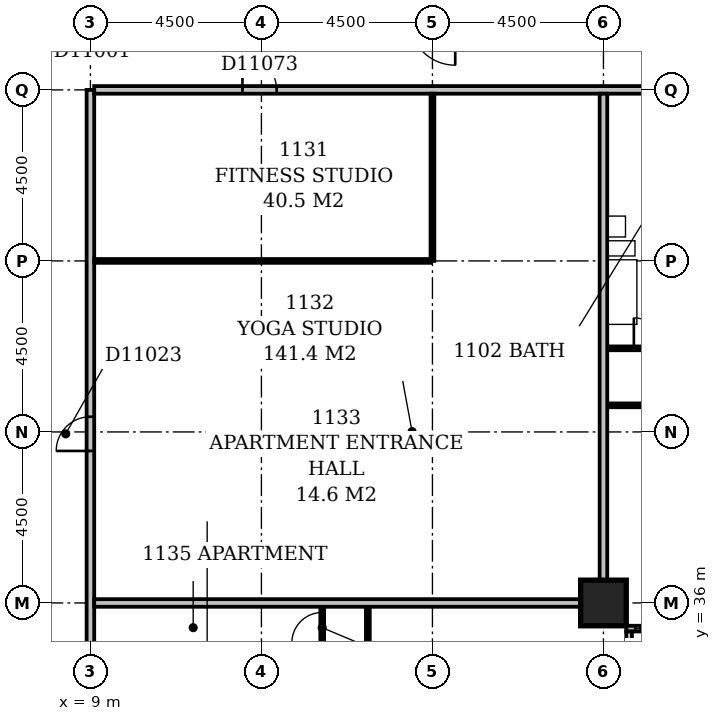
"""IFC4 building model, lengths in metres.
Left out: names, types, materials, properties, quantities, classifications, styles, units other than length and angle.
Written with IfcOpenShell. Run it as: python <this file> out.ifc"""

import sys

from ifc_helpers import new_model, si_unit, direction, frame, frame_2d, origin, origin_2d, place, context, subcontext, project, spatial, rectangle, extrude, element, fill, save


model = new_model("IFC4")
c1 = context("Model", 3, precision=1e-05, world=origin(), true_north=direction((0.0, 1.0)))
c2 = subcontext(c1, "Body", "Model", "MODEL_VIEW")
j1 = project(units=[si_unit("LENGTHUNIT", "METRE"), si_unit("PLANEANGLEUNIT", "RADIAN")], contexts=[c1])
p1 = place(None, origin())
s1 = spatial("IfcSite", under=j1, at=p1, CompositionType="ELEMENT")
p2 = place(p1, origin())
s2 = spatial("IfcBuilding", under=s1, at=p2, CompositionType="ELEMENT")
p3 = place(p2, frame((0.0, 0.0, 50.6)))
s3 = spatial("IfcBuildingStorey", under=s2, at=p3, CompositionType="ELEMENT", Elevation=50.6)
p4 = place(p3, frame((22.5, 36.0, -0.3), z_axis=(0.0, 0.0, 1.0), x_axis=(1.0, 0.0, 0.0)))
e1 = element("IfcColumn", 1, at=p4, inside=s3, PredefinedType="COLUMN", context=c2, shape_type="SweptSolid", body=[
    extrude(rectangle(XDim=1.2, YDim=1.2, at=origin_2d()), origin(), (0.0, 0.0, 1.0), 3.6),
])
p5 = place(p3, frame((23.175, 17.4, 0.0), z_axis=(0.0, 0.0, 1.0), x_axis=(0.0, 1.0, 0.0)))
e2 = element("IfcWall", 2, at=p5, inside=s3, PredefinedType="STANDARD", context=c2, shape_type="SweptSolid", body=[
    extrude(rectangle(XDim=17.85, YDim=0.15, at=frame_2d((8.925, 0.0))), origin(), (0.0, 0.0, 1.0), 2.7),
])
p6 = place(p5, frame((3.375, 0.0, 0.6)))
e3 = element("IfcOpeningElement", 3, at=p6, cuts=e2, PredefinedType="OPENING", context=c2, shape_type="SweptSolid", body=[
    extrude(rectangle(XDim=0.9, YDim=1.8, at=frame_2d((0.45, 0.9))), frame((0.0, 0.087, 0.0), z_axis=(0.0, -1.0, 0.0), x_axis=(1.0, 0.0, 0.0)), (0.0, 0.0, 1.0), 0.174),
])
p7 = place(p5, frame((6.15, 0.0, 0.6)))
e4 = element("IfcOpeningElement", 4, at=p7, cuts=e2, PredefinedType="OPENING", context=c2, shape_type="SweptSolid", body=[
    extrude(rectangle(XDim=2.4, YDim=1.8, at=frame_2d((1.2, 0.9))), frame((0.0, 0.087, 0.0), z_axis=(0.0, -1.0, 0.0), x_axis=(1.0, 0.0, 0.0)), (0.0, 0.0, 1.0), 0.174),
])
p8 = place(p5, frame((10.65, 0.0, 0.6)))
e5 = element("IfcOpeningElement", 5, at=p8, cuts=e2, PredefinedType="OPENING", context=c2, shape_type="SweptSolid", body=[
    extrude(rectangle(XDim=2.4, YDim=1.8, at=frame_2d((1.2, 0.9))), frame((0.0, 0.087, 0.0), z_axis=(0.0, -1.0, 0.0), x_axis=(1.0, 0.0, 0.0)), (0.0, 0.0, 1.0), 0.174),
])
p9 = place(p5, frame((14.992, 0.0, 0.6)))
e6 = element("IfcOpeningElement", 6, at=p9, cuts=e2, PredefinedType="OPENING", context=c2, shape_type="SweptSolid", body=[
    extrude(rectangle(XDim=2.1, YDim=1.8, at=frame_2d((1.05, 0.9))), frame((0.0, 0.087, 0.0), z_axis=(0.0, -1.0, 0.0), x_axis=(1.0, 0.0, 0.0)), (0.0, 0.0, 1.0), 0.174),
])
p10 = place(p3, frame((23.1, 35.325, 0.0), z_axis=(0.0, 0.0, 1.0), x_axis=(1.0, 0.0, 0.0)))
e7 = element("IfcWall", 7, at=p10, inside=s3, PredefinedType="STANDARD", context=c2, shape_type="SweptSolid", body=[
    extrude(rectangle(XDim=45.15, YDim=0.15, at=frame_2d((22.575, 0.0))), origin(), (0.0, 0.0, 1.0), 2.7),
])
p11 = place(p10, frame((0.235, 0.0, 0.6)))
e8 = element("IfcOpeningElement", 8, at=p11, cuts=e7, PredefinedType="OPENING", context=c2, shape_type="SweptSolid", body=[
    extrude(rectangle(XDim=0.45, YDim=1.8, at=frame_2d((0.225, 0.9))), frame((0.0, 0.087, 0.0), z_axis=(0.0, -1.0, 0.0), x_axis=(1.0, 0.0, 0.0)), (0.0, 0.0, 1.0), 0.174),
])
p12 = place(p10, frame((2.605, 0.0, 0.6)))
e9 = element("IfcOpeningElement", 9, at=p12, cuts=e7, PredefinedType="OPENING", context=c2, shape_type="SweptSolid", body=[
    extrude(rectangle(XDim=0.45, YDim=1.8, at=frame_2d((0.225, 0.9))), frame((0.0, 0.087, 0.0), z_axis=(0.0, -1.0, 0.0), x_axis=(1.0, 0.0, 0.0)), (0.0, 0.0, 1.0), 0.174),
])
p13 = place(p10, frame((4.95, 0.0, 0.6)))
e10 = element("IfcOpeningElement", 10, at=p13, cuts=e7, PredefinedType="OPENING", context=c2, shape_type="SweptSolid", body=[
    extrude(rectangle(XDim=2.4, YDim=1.8, at=frame_2d((1.2, 0.9))), frame((0.0, 0.087, 0.0), z_axis=(0.0, -1.0, 0.0), x_axis=(1.0, 0.0, 0.0)), (0.0, 0.0, 1.0), 0.174),
])
p14 = place(p10, frame((9.45, 0.0, 0.6)))
e11 = element("IfcOpeningElement", 11, at=p14, cuts=e7, PredefinedType="OPENING", context=c2, shape_type="SweptSolid", body=[
    extrude(rectangle(XDim=2.4, YDim=1.8, at=frame_2d((1.2, 0.9))), frame((0.0, 0.087, 0.0), z_axis=(0.0, -1.0, 0.0), x_axis=(1.0, 0.0, 0.0)), (0.0, 0.0, 1.0), 0.174),
])
p15 = place(p10, frame((13.95, 0.0, 0.6)))
e12 = element("IfcOpeningElement", 12, at=p15, cuts=e7, PredefinedType="OPENING", context=c2, shape_type="SweptSolid", body=[
    extrude(rectangle(XDim=2.4, YDim=1.8, at=frame_2d((1.2, 0.9))), frame((0.0, 0.087, 0.0), z_axis=(0.0, -1.0, 0.0), x_axis=(1.0, 0.0, 0.0)), (0.0, 0.0, 1.0), 0.174),
])
p16 = place(p10, frame((18.45, 0.0, 0.6)))
e13 = element("IfcOpeningElement", 13, at=p16, cuts=e7, PredefinedType="OPENING", context=c2, shape_type="SweptSolid", body=[
    extrude(rectangle(XDim=2.4, YDim=1.8, at=frame_2d((1.2, 0.9))), frame((0.0, 0.087, 0.0), z_axis=(0.0, -1.0, 0.0), x_axis=(1.0, 0.0, 0.0)), (0.0, 0.0, 1.0), 0.174),
])
p17 = place(p10, frame((22.823, 0.0, 0.6)))
e14 = element("IfcOpeningElement", 14, at=p17, cuts=e7, PredefinedType="OPENING", context=c2, shape_type="SweptSolid", body=[
    extrude(rectangle(XDim=1.2, YDim=1.8, at=frame_2d((0.6, 0.9))), frame((0.0, 0.087, 0.0), z_axis=(0.0, -1.0, 0.0), x_axis=(1.0, 0.0, 0.0)), (0.0, 0.0, 1.0), 0.174),
])
p18 = place(p10, frame((29.403, 0.0, 0.6)))
e15 = element("IfcOpeningElement", 15, at=p18, cuts=e7, PredefinedType="OPENING", context=c2, shape_type="SweptSolid", body=[
    extrude(rectangle(XDim=0.6, YDim=1.8, at=frame_2d((0.3, 0.9))), frame((0.0, 0.087, 0.0), z_axis=(0.0, -1.0, 0.0), x_axis=(1.0, 0.0, 0.0)), (0.0, 0.0, 1.0), 0.174),
])
p19 = place(p10, frame((31.95, 0.0, 0.6)))
e16 = element("IfcOpeningElement", 16, at=p19, cuts=e7, PredefinedType="OPENING", context=c2, shape_type="SweptSolid", body=[
    extrude(rectangle(XDim=2.4, YDim=1.8, at=frame_2d((1.2, 0.9))), frame((0.0, 0.087, 0.0), z_axis=(0.0, -1.0, 0.0), x_axis=(1.0, 0.0, 0.0)), (0.0, 0.0, 1.0), 0.174),
])
p20 = place(p10, frame((36.45, 0.0, 0.6)))
e17 = element("IfcOpeningElement", 17, at=p20, cuts=e7, PredefinedType="OPENING", context=c2, shape_type="SweptSolid", body=[
    extrude(rectangle(XDim=2.4, YDim=1.8, at=frame_2d((1.2, 0.9))), frame((0.0, 0.087, 0.0), z_axis=(0.0, -1.0, 0.0), x_axis=(1.0, 0.0, 0.0)), (0.0, 0.0, 1.0), 0.174),
])
p21 = place(p10, frame((40.95, 0.0, 0.6)))
e18 = element("IfcOpeningElement", 18, at=p21, cuts=e7, PredefinedType="OPENING", context=c2, shape_type="SweptSolid", body=[
    extrude(rectangle(XDim=2.4, YDim=1.8, at=frame_2d((1.2, 0.9))), frame((0.0, 0.087, 0.0), z_axis=(0.0, -1.0, 0.0), x_axis=(1.0, 0.0, 0.0)), (0.0, 0.0, 1.0), 0.174),
])
p22 = place(p3, frame((9.0, 5.0, 0.0), z_axis=(0.0, 0.0, 1.0), x_axis=(0.0, 1.0, 0.0)))
e19 = element("IfcWall", 19, at=p22, inside=s3, PredefinedType="PARTITIONING", context=c2, shape_type="SweptSolid", body=[
    extrude(rectangle(XDim=44.5, YDim=0.2, at=frame_2d((22.25, 0.0))), origin(), (0.0, 0.0, 1.0), 3.3),
])
p23 = place(p22, frame((28.45, 0.0, 0.0)))
e20 = element("IfcOpeningElement", 20, at=p23, cuts=e19, PredefinedType="OPENING", context=c2, shape_type="SweptSolid", body=[
    extrude(rectangle(XDim=1.0, YDim=2.1, at=frame_2d((0.5, 1.05))), frame((0.0, 0.112, 0.0), z_axis=(0.0, -1.0, 0.0), x_axis=(1.0, 0.0, 0.0)), (0.0, 0.0, 1.0), 0.224),
])
p24 = place(p22, frame((17.8, 0.0, 0.0)))
e21 = element("IfcOpeningElement", 21, at=p24, cuts=e19, PredefinedType="OPENING", context=c2, shape_type="SweptSolid", body=[
    extrude(rectangle(XDim=1.0, YDim=2.1, at=frame_2d((0.5, 1.05))), frame((0.0, 0.112, 0.0), z_axis=(0.0, -1.0, 0.0), x_axis=(1.0, 0.0, 0.0)), (0.0, 0.0, 1.0), 0.224),
])
p25 = place(p22, frame((14.55, 0.0, 0.0)))
e22 = element("IfcOpeningElement", 22, at=p25, cuts=e19, PredefinedType="OPENING", context=c2, shape_type="SweptSolid", body=[
    extrude(rectangle(XDim=1.0, YDim=2.1, at=frame_2d((0.5, 1.05))), frame((0.0, 0.112, 0.0), z_axis=(0.0, -1.0, 0.0), x_axis=(1.0, 0.0, 0.0)), (0.0, 0.0, 1.0), 0.224),
])
p26 = place(p22, frame((11.7, 0.0, 0.0)))
e23 = element("IfcOpeningElement", 23, at=p26, cuts=e19, PredefinedType="OPENING", context=c2, shape_type="SweptSolid", body=[
    extrude(rectangle(XDim=1.0, YDim=2.1, at=frame_2d((0.5, 1.05))), frame((0.0, 0.112, 0.0), z_axis=(0.0, -1.0, 0.0), x_axis=(1.0, 0.0, 0.0)), (0.0, 0.0, 1.0), 0.224),
])
p27 = place(p22, frame((35.0, 0.0, 0.0)))
e24 = element("IfcOpeningElement", 24, at=p27, cuts=e19, PredefinedType="OPENING", context=c2, shape_type="SweptSolid", body=[
    extrude(rectangle(XDim=0.9, YDim=2.1, at=frame_2d((0.45, 1.05))), frame((0.0, 0.112, 0.0), z_axis=(0.0, -1.0, 0.0), x_axis=(1.0, 0.0, 0.0)), (0.0, 0.0, 1.0), 0.224),
])
p28 = place(p22, frame((1.5, 0.0, 0.0)))
e25 = element("IfcOpeningElement", 25, at=p28, cuts=e19, PredefinedType="OPENING", context=c2, shape_type="SweptSolid", body=[
    extrude(rectangle(XDim=0.9, YDim=2.1, at=frame_2d((0.45, 1.05))), frame((0.0, 0.112, 0.0), z_axis=(0.0, -1.0, 0.0), x_axis=(1.0, 0.0, 0.0)), (0.0, 0.0, 1.0), 0.224),
])
p29 = place(p3, frame((16.3, 31.6, 0.0), z_axis=(0.0, 0.0, 1.0), x_axis=(0.0, 1.0, 0.0)))
e26 = element("IfcWall", 26, at=p29, inside=s3, PredefinedType="PARTITIONING", context=c2, shape_type="SweptSolid", body=[
    extrude(rectangle(XDim=4.3, YDim=0.1, at=frame_2d((2.15, 0.0))), origin(), (0.0, 0.0, 1.0), 3.3),
])
p30 = place(p29, frame((1.7, 0.0, 0.0)))
e27 = element("IfcOpeningElement", 27, at=p30, cuts=e26, PredefinedType="OPENING", context=c2, shape_type="SweptSolid", body=[
    extrude(rectangle(XDim=0.9, YDim=2.1, at=frame_2d((0.45, 1.05))), frame((0.0, 0.062, 0.0), z_axis=(0.0, -1.0, 0.0), x_axis=(1.0, 0.0, 0.0)), (0.0, 0.0, 1.0), 0.124),
])
p31 = place(p3, frame((15.1, 34.7, 0.0), z_axis=(0.0, 0.0, 1.0), x_axis=(0.0, 1.0, 0.0)))
e28 = element("IfcWall", 28, at=p31, inside=s3, PredefinedType="PARTITIONING", context=c2, shape_type="SweptSolid", body=[
    extrude(rectangle(XDim=1.2, YDim=0.1, at=frame_2d((0.6, 0.0))), origin(), (0.0, 0.0, 1.0), 3.3),
])
p32 = place(p31, frame((0.25, 0.0, 0.0)))
e29 = element("IfcOpeningElement", 29, at=p32, cuts=e28, PredefinedType="OPENING", context=c2, shape_type="SweptSolid", body=[
    extrude(rectangle(XDim=0.8, YDim=2.1, at=frame_2d((0.4, 1.05))), frame((0.0, 0.062, 0.0), z_axis=(0.0, -1.0, 0.0), x_axis=(1.0, 0.0, 0.0)), (0.0, 0.0, 1.0), 0.124),
])
p33 = place(p3, frame((9.1, 36.0, 0.0), z_axis=(0.0, 0.0, 1.0), x_axis=(1.0, 0.0, 0.0)))
e30 = element("IfcWall", 30, at=p33, inside=s3, PredefinedType="PARTITIONING", context=c2, shape_type="SweptSolid", body=[
    extrude(rectangle(XDim=12.8, YDim=0.2, at=frame_2d((6.4, 0.0))), origin(), (0.0, 0.0, 1.0), 2.4),
])
p34 = place(p3, frame((22.5, 36.6, 0.0), z_axis=(0.0, 0.0, 1.0), x_axis=(0.0, 1.0, 0.0)))
e31 = element("IfcWall", 31, at=p34, inside=s3, PredefinedType="PARTITIONING", context=c2, shape_type="SweptSolid", body=[
    extrude(rectangle(XDim=12.8, YDim=0.2, at=frame_2d((6.4, 0.0))), origin(), (0.0, 0.0, 1.0), 3.3),
])
p35 = place(p3, frame((22.6, 41.2, 0.0), z_axis=(0.0, 0.0, 1.0), x_axis=(1.0, 0.0, 0.0)))
e32 = element("IfcWall", 32, at=p35, inside=s3, PredefinedType="PARTITIONING", context=c2, shape_type="SweptSolid", body=[
    extrude(rectangle(XDim=17.8, YDim=0.1, at=frame_2d((8.9, 0.0))), origin(), (0.0, 0.0, 1.0), 3.3),
])
p36 = place(p35, frame((1.7, 0.0, 0.0)))
e33 = element("IfcOpeningElement", 33, at=p36, cuts=e32, PredefinedType="OPENING", context=c2, shape_type="SweptSolid", body=[
    extrude(rectangle(XDim=0.9, YDim=2.1, at=frame_2d((0.45, 1.05))), frame((0.0, 0.062, 0.0), z_axis=(0.0, -1.0, 0.0), x_axis=(1.0, 0.0, 0.0)), (0.0, 0.0, 1.0), 0.124),
])
p37 = place(p35, frame((6.2, 0.0, 0.0)))
e34 = element("IfcOpeningElement", 34, at=p37, cuts=e32, PredefinedType="OPENING", context=c2, shape_type="SweptSolid", body=[
    extrude(rectangle(XDim=0.9, YDim=2.1, at=frame_2d((0.45, 1.05))), frame((0.0, 0.062, 0.0), z_axis=(0.0, -1.0, 0.0), x_axis=(1.0, 0.0, 0.0)), (0.0, 0.0, 1.0), 0.124),
])
p38 = place(p35, frame((11.85, 0.0, 0.0)))
e35 = element("IfcOpeningElement", 35, at=p38, cuts=e32, PredefinedType="OPENING", context=c2, shape_type="SweptSolid", body=[
    extrude(rectangle(XDim=0.9, YDim=2.1, at=frame_2d((0.45, 1.05))), frame((0.0, 0.062, 0.0), z_axis=(0.0, -1.0, 0.0), x_axis=(1.0, 0.0, 0.0)), (0.0, 0.0, 1.0), 0.124),
])
p39 = place(p35, frame((15.2, 0.0, 0.0)))
e36 = element("IfcOpeningElement", 36, at=p39, cuts=e32, PredefinedType="OPENING", context=c2, shape_type="SweptSolid", body=[
    extrude(rectangle(XDim=0.9, YDim=2.1, at=frame_2d((0.45, 1.05))), frame((0.0, 0.062, 0.0), z_axis=(0.0, -1.0, 0.0), x_axis=(1.0, 0.0, 0.0)), (0.0, 0.0, 1.0), 0.124),
])
p40 = place(p3, frame((22.6, 42.7, 0.0), z_axis=(0.0, 0.0, 1.0), x_axis=(1.0, 0.0, 0.0)))
e37 = element("IfcWall", 37, at=p40, inside=s3, PredefinedType="PARTITIONING", context=c2, shape_type="SweptSolid", body=[
    extrude(rectangle(XDim=2.25, YDim=0.1, at=frame_2d((1.125, 0.0))), origin(), (0.0, 0.0, 1.0), 3.3),
])
p41 = place(p40, frame((0.7, 0.0, 0.0)))
e38 = element("IfcOpeningElement", 38, at=p41, cuts=e37, PredefinedType="OPENING", context=c2, shape_type="SweptSolid", body=[
    extrude(rectangle(XDim=0.8, YDim=2.1, at=frame_2d((0.4, 1.05))), frame((0.0, 0.062, 0.0), z_axis=(0.0, -1.0, 0.0), x_axis=(1.0, 0.0, 0.0)), (0.0, 0.0, 1.0), 0.124),
])
p42 = place(p3, frame((9.1, 45.0, 0.0), z_axis=(0.0, 0.0, 1.0), x_axis=(1.0, 0.0, 0.0)))
e39 = element("IfcWall", 39, at=p42, inside=s3, PredefinedType="PARTITIONING", context=c2, shape_type="SweptSolid", body=[
    extrude(rectangle(XDim=8.85, YDim=0.1, at=frame_2d((4.425, 0.0))), origin(), (0.0, 0.0, 1.0), 3.3),
])
p43 = place(p3, frame((18.0, 45.0, 0.0), z_axis=(0.0, 0.0, 1.0), x_axis=(0.0, 1.0, 0.0)))
e40 = element("IfcWall", 40, at=p43, inside=s3, PredefinedType="PARTITIONING", context=c2, shape_type="SweptSolid", body=[
    extrude(rectangle(XDim=4.4, YDim=0.1, at=frame_2d((2.2, 0.0))), origin(), (0.0, 0.0, 1.0), 3.3),
])
p44 = place(p3, frame((9.1, 49.5, 0.0), z_axis=(0.0, 0.0, 1.0), x_axis=(1.0, 0.0, 0.0)))
e41 = element("IfcWall", 41, at=p44, inside=s3, PredefinedType="PARTITIONING", context=c2, shape_type="SweptSolid", body=[
    extrude(rectangle(XDim=57.8, YDim=0.2, at=frame_2d((28.9, 0.0))), origin(), (0.0, 0.0, 1.0), 3.3),
])
p45 = place(p44, frame((16.1, 0.0, 0.0)))
e42 = element("IfcOpeningElement", 42, at=p45, cuts=e41, PredefinedType="OPENING", context=c2, shape_type="SweptSolid", body=[
    extrude(rectangle(XDim=1.0, YDim=2.1, at=frame_2d((0.5, 1.05))), frame((0.0, 0.112, 0.0), z_axis=(0.0, -1.0, 0.0), x_axis=(1.0, 0.0, 0.0)), (0.0, 0.0, 1.0), 0.224),
])
p46 = place(p44, frame((40.0, 0.0, 0.0)))
e43 = element("IfcOpeningElement", 43, at=p46, cuts=e41, PredefinedType="OPENING", context=c2, shape_type="SweptSolid", body=[
    extrude(rectangle(XDim=1.0, YDim=2.1, at=frame_2d((0.5, 1.05))), frame((0.0, 0.112, 0.0), z_axis=(0.0, -1.0, 0.0), x_axis=(1.0, 0.0, 0.0)), (0.0, 0.0, 1.0), 0.224),
])
p47 = place(p44, frame((45.2, 0.0, 0.0)))
e44 = element("IfcOpeningElement", 44, at=p47, cuts=e41, PredefinedType="OPENING", context=c2, shape_type="SweptSolid", body=[
    extrude(rectangle(XDim=1.0, YDim=2.1, at=frame_2d((0.5, 1.05))), frame((0.0, 0.112, 0.0), z_axis=(0.0, -1.0, 0.0), x_axis=(1.0, 0.0, 0.0)), (0.0, 0.0, 1.0), 0.224),
])
p48 = place(p44, frame((3.9, 0.0, 0.0)))
e45 = element("IfcOpeningElement", 45, at=p48, cuts=e41, PredefinedType="OPENING", context=c2, shape_type="SweptSolid", body=[
    extrude(rectangle(XDim=0.9, YDim=2.1, at=frame_2d((0.45, 1.05))), frame((0.0, 0.112, 0.0), z_axis=(0.0, -1.0, 0.0), x_axis=(1.0, 0.0, 0.0)), (0.0, 0.0, 1.0), 0.224),
])
p49 = place(p11, origin())
e46 = element("IfcWindow", 46, at=p49, inside=s3, PartitioningType="SINGLE_PANEL", PredefinedType="WINDOW", context=c2, shape_type="SweptSolid", body=[
    extrude(rectangle(XDim=0.45, YDim=1.8, at=frame_2d((0.225, 0.9))), frame((0.0, 0.03, 0.0), z_axis=(0.0, -1.0, 0.0), x_axis=(1.0, 0.0, 0.0)), (0.0, 0.0, 1.0), 0.06),
])
fill(e8, e46)
p50 = place(p27, origin())
e47 = element("IfcDoor", 47, at=p50, inside=s3, OperationType="SINGLE_SWING_LEFT", PredefinedType="DOOR", context=c2, shape_type="SweptSolid", body=[
    extrude(rectangle(XDim=0.9, YDim=2.1, at=frame_2d((0.45, 1.05))), frame((0.0, 0.025, 0.0), z_axis=(0.0, -1.0, 0.0), x_axis=(1.0, 0.0, 0.0)), (0.0, 0.0, 1.0), 0.05),
])
fill(e24, e47)
p51 = place(p32, origin())
e48 = element("IfcDoor", 48, at=p51, inside=s3, OperationType="SINGLE_SWING_LEFT", PredefinedType="DOOR", context=c2, shape_type="SweptSolid", body=[
    extrude(rectangle(XDim=0.8, YDim=2.1, at=frame_2d((0.4, 1.05))), frame((0.0, 0.025, 0.0), z_axis=(0.0, -1.0, 0.0), x_axis=(1.0, 0.0, 0.0)), (0.0, 0.0, 1.0), 0.05),
])
fill(e29, e48)
p52 = place(p41, origin())
e49 = element("IfcDoor", 49, at=p52, inside=s3, OperationType="SINGLE_SWING_LEFT", PredefinedType="DOOR", context=c2, shape_type="SweptSolid", body=[
    extrude(rectangle(XDim=0.8, YDim=2.1, at=frame_2d((0.4, 1.05))), frame((0.0, 0.025, 0.0), z_axis=(0.0, -1.0, 0.0), x_axis=(1.0, 0.0, 0.0)), (0.0, 0.0, 1.0), 0.05),
])
fill(e38, e49)
p53 = place(p48, origin())
e50 = element("IfcDoor", 50, at=p53, inside=s3, OperationType="SINGLE_SWING_LEFT", PredefinedType="DOOR", context=c2, shape_type="SweptSolid", body=[
    extrude(rectangle(XDim=0.9, YDim=2.1, at=frame_2d((0.45, 1.05))), frame((0.0, 0.025, 0.0), z_axis=(0.0, -1.0, 0.0), x_axis=(1.0, 0.0, 0.0)), (0.0, 0.0, 1.0), 0.05),
])
fill(e45, e50)
save(model, sys.argv[1])
